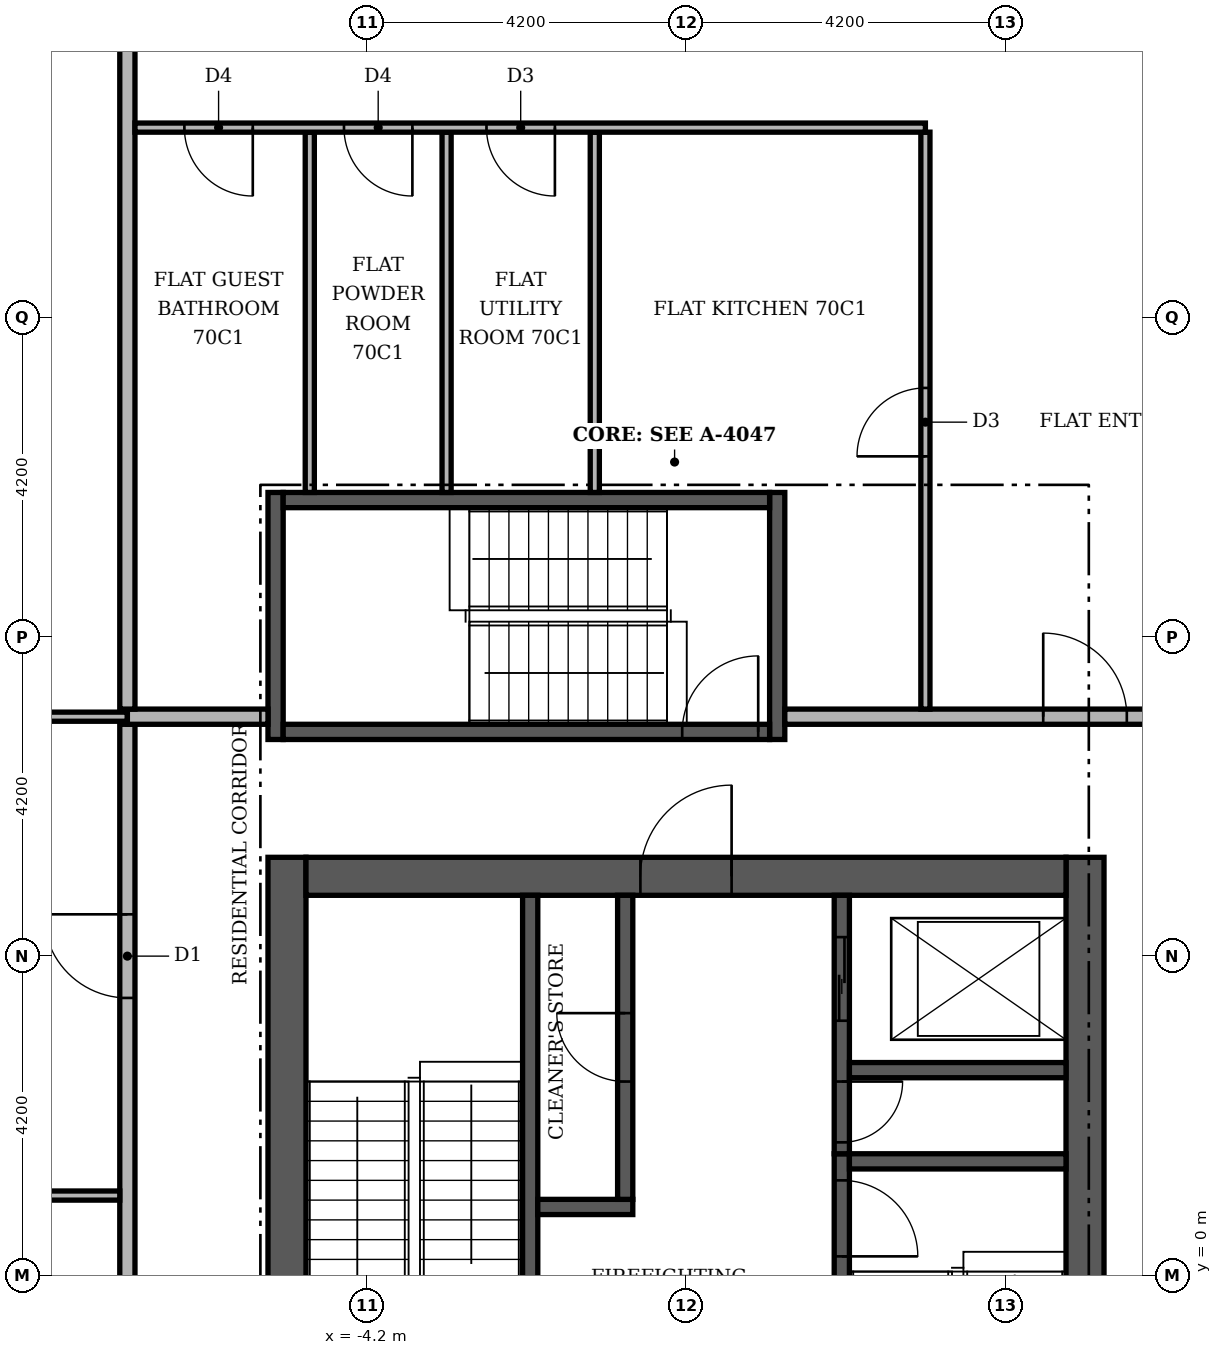
"""IFC4 building model, lengths in metres.
Left out: names, types, materials, properties, quantities, classifications, styles, units other than length and angle.
Written with IfcOpenShell. Run it as: python <this file> out.ifc"""

import sys

from ifc_helpers import new_model, si_unit, direction, frame, frame_2d, origin, place, context, subcontext, project, spatial, rectangle, extrude, element, fill, save


model = new_model("IFC4")
c1 = context("Model", 3, precision=1e-05, world=origin(), true_north=direction((0.0, 1.0)))
c2 = subcontext(c1, "Body", "Model", "MODEL_VIEW")
j1 = project(units=[si_unit("LENGTHUNIT", "METRE"), si_unit("PLANEANGLEUNIT", "RADIAN")], contexts=[c1])
p1 = place(None, origin())
s1 = spatial("IfcSite", under=j1, at=p1, CompositionType="ELEMENT")
p2 = place(p1, origin())
s2 = spatial("IfcBuilding", under=s1, at=p2, CompositionType="ELEMENT")
p3 = place(p2, frame((0.0, 0.0, 292.8)))
s3 = spatial("IfcBuildingStorey", under=s2, at=p3, CompositionType="ELEMENT", Elevation=292.8)
for number, where, z_axis, x_axis in (
    (1, (-5.25, -5.0, 0.0), (0.0, 0.0, 1.0), (0.0, 1.0, 0.0)),
    (2, (5.25, -5.0, 0.0), (0.0, 0.0, 1.0), (0.0, 1.0, 0.0)),
):
    element("IfcWall", number, at=place(p3, frame(where, z_axis=z_axis, x_axis=x_axis)), inside=s3, PredefinedType="SHEAR", context=c2, shape_type="SweptSolid", body=[
        extrude(rectangle(XDim=10.5, YDim=0.5, at=frame_2d((5.25, 0.0))), origin(), (0.0, 0.0, 1.0), 3.55),
    ])
p4 = place(p3, frame((-5.0, 5.25, 0.0), z_axis=(0.0, 0.0, 1.0), x_axis=(1.0, 0.0, 0.0)))
e3 = element("IfcWall", 3, at=p4, inside=s3, PredefinedType="SHEAR", context=c2, shape_type="SweptSolid", body=[
    extrude(rectangle(XDim=10.0, YDim=0.5, at=frame_2d((5.0, 0.0))), origin(), (0.0, 0.0, 1.0), 3.55),
])
p5 = place(p4, frame((4.4, 0.0, 0.0)))
e4 = element("IfcOpeningElement", 4, at=p5, cuts=e3, PredefinedType="OPENING", context=c2, shape_type="SweptSolid", body=[
    extrude(rectangle(XDim=1.2, YDim=2.1, at=frame_2d((0.6, 1.05))), frame((0.0, 0.26, 0.0), z_axis=(0.0, -1.0, 0.0), x_axis=(1.0, 0.0, 0.0)), (0.0, 0.0, 1.0), 0.52),
])
p6 = place(p3, frame((2.05, -5.0, 0.0), z_axis=(0.0, 0.0, 1.0), x_axis=(0.0, 1.0, 0.0)))
e5 = element("IfcWall", 5, at=p6, inside=s3, PredefinedType="SHEAR", context=c2, shape_type="SweptSolid", body=[
    extrude(rectangle(XDim=6.6, YDim=0.2, at=frame_2d((3.3, 0.0))), origin(), (0.0, 0.0, 1.0), 3.55),
])
p7 = place(p6, frame((5.25, 0.0, 0.0)))
e6 = element("IfcOpeningElement", 6, at=p7, cuts=e5, PredefinedType="OPENING", context=c2, shape_type="SweptSolid", body=[
    extrude(rectangle(XDim=1.0, YDim=2.1, at=frame_2d((0.5, 1.05))), frame((0.0, 0.11, 0.0), z_axis=(0.0, -1.0, 0.0), x_axis=(1.0, 0.0, 0.0)), (0.0, 0.0, 1.0), 0.22),
])
p8 = place(p3, frame((-2.05, -1.4, 0.0), z_axis=(0.0, 0.0, 1.0), x_axis=(0.0, 1.0, 0.0)))
e7 = element("IfcWall", 7, at=p8, inside=s3, PredefinedType="SHEAR", context=c2, shape_type="SweptSolid", body=[
    extrude(rectangle(XDim=6.4, YDim=0.2, at=frame_2d((3.2, 0.0))), origin(), (0.0, 0.0, 1.0), 3.55),
])
p9 = place(p8, frame((0.15, 0.0, 0.0)))
e8 = element("IfcOpeningElement", 8, at=p9, cuts=e7, PredefinedType="OPENING", context=c2, shape_type="SweptSolid", body=[
    extrude(rectangle(XDim=1.0, YDim=2.1, at=frame_2d((0.5, 1.05))), frame((0.0, 0.11, 0.0), z_axis=(0.0, -1.0, 0.0), x_axis=(1.0, 0.0, 0.0)), (0.0, 0.0, 1.0), 0.22),
])
p10 = place(p3, frame((2.15, 1.5, 0.0), z_axis=(0.0, 0.0, 1.0), x_axis=(1.0, 0.0, 0.0)))
e9 = element("IfcWall", 9, at=p10, inside=s3, PredefinedType="SHEAR", context=c2, shape_type="SweptSolid", body=[
    extrude(rectangle(XDim=2.85, YDim=0.2, at=frame_2d((1.425, 0.0))), origin(), (0.0, 0.0, 1.0), 3.55),
])
p11 = place(p3, frame((-1.95, 0.9, 0.0), z_axis=(0.0, 0.0, 1.0), x_axis=(1.0, 0.0, 0.0)))
e10 = element("IfcWall", 10, at=p11, inside=s3, PredefinedType="SHEAR", context=c2, shape_type="SweptSolid", body=[
    extrude(rectangle(XDim=1.25, YDim=0.2, at=frame_2d((0.625, 0.0))), origin(), (0.0, 0.0, 1.0), 3.55),
])
p12 = place(p3, frame((-0.8, 1.0, 0.0), z_axis=(0.0, 0.0, 1.0), x_axis=(0.0, 1.0, 0.0)))
e11 = element("IfcWall", 11, at=p12, inside=s3, PredefinedType="SHEAR", context=c2, shape_type="SweptSolid", body=[
    extrude(rectangle(XDim=4.0, YDim=0.2, at=frame_2d((2.0, 0.0))), origin(), (0.0, 0.0, 1.0), 3.55),
])
p13 = place(p12, frame((1.55, 0.0, 0.0)))
e12 = element("IfcOpeningElement", 12, at=p13, cuts=e11, PredefinedType="OPENING", context=c2, shape_type="SweptSolid", body=[
    extrude(rectangle(XDim=0.9, YDim=2.1, at=frame_2d((0.45, 1.05))), frame((0.0, 0.11, 0.0), z_axis=(0.0, -1.0, 0.0), x_axis=(1.0, 0.0, 0.0)), (0.0, 0.0, 1.0), 0.22),
])
p14 = place(p3, frame((2.05, 1.6, 0.0), z_axis=(0.0, 0.0, 1.0), x_axis=(0.0, 1.0, 0.0)))
e13 = element("IfcWall", 13, at=p14, inside=s3, PredefinedType="SHEAR", context=c2, shape_type="SweptSolid", body=[
    extrude(rectangle(XDim=3.4, YDim=0.2, at=frame_2d((1.7, 0.0))), origin(), (0.0, 0.0, 1.0), 3.55),
])
p15 = place(p14, frame((1.75, 0.0, 0.0)))
e14 = element("IfcOpeningElement", 14, at=p15, cuts=e13, PredefinedType="OPENING", context=c2, shape_type="SweptSolid", body=[
    extrude(rectangle(XDim=1.1, YDim=2.1, at=frame_2d((0.55, 1.05))), frame((0.0, 0.11, 0.0), z_axis=(0.0, -1.0, 0.0), x_axis=(1.0, 0.0, 0.0)), (0.0, 0.0, 1.0), 0.22),
])
p16 = place(p14, frame((0.15, 0.0, 0.0)))
e15 = element("IfcOpeningElement", 15, at=p16, cuts=e13, PredefinedType="OPENING", context=c2, shape_type="SweptSolid", body=[
    extrude(rectangle(XDim=0.8, YDim=2.1, at=frame_2d((0.4, 1.05))), frame((0.0, 0.11, 0.0), z_axis=(0.0, -1.0, 0.0), x_axis=(1.0, 0.0, 0.0)), (0.0, 0.0, 1.0), 0.22),
])
p17 = place(p3, frame((2.15, 2.7, 0.0), z_axis=(0.0, 0.0, 1.0), x_axis=(1.0, 0.0, 0.0)))
e16 = element("IfcWall", 16, at=p17, inside=s3, PredefinedType="SHEAR", context=c2, shape_type="SweptSolid", body=[
    extrude(rectangle(XDim=2.85, YDim=0.2, at=frame_2d((1.425, 0.0))), origin(), (0.0, 0.0, 1.0), 3.55),
])
for number, where, z_axis, x_axis in (
    (17, (-5.4, 7.05, 0.0), (0.0, 0.0, 1.0), (0.0, 1.0, 0.0)),
    (18, (1.2, 7.05, 0.0), (0.0, 0.0, 1.0), (0.0, 1.0, 0.0)),
):
    element("IfcWall", number, at=place(p3, frame(where, z_axis=z_axis, x_axis=x_axis)), inside=s3, PredefinedType="SHEAR", context=c2, shape_type="SweptSolid", body=[
        extrude(rectangle(XDim=3.25, YDim=0.2, at=frame_2d((1.625, 0.0))), origin(), (0.0, 0.0, 1.0), 3.55),
    ])
p18 = place(p3, frame((-5.3, 7.15, 0.0), z_axis=(0.0, 0.0, 1.0), x_axis=(1.0, 0.0, 0.0)))
e19 = element("IfcWall", 19, at=p18, inside=s3, PredefinedType="SHEAR", context=c2, shape_type="SweptSolid", body=[
    extrude(rectangle(XDim=6.4, YDim=0.2, at=frame_2d((3.2, 0.0))), origin(), (0.0, 0.0, 1.0), 3.55),
])
p19 = place(p18, frame((5.25, 0.0, 0.0)))
e20 = element("IfcOpeningElement", 20, at=p19, cuts=e19, PredefinedType="OPENING", context=c2, shape_type="SweptSolid", body=[
    extrude(rectangle(XDim=1.0, YDim=2.1, at=frame_2d((0.5, 1.05))), frame((0.0, 0.11, 0.0), z_axis=(0.0, -1.0, 0.0), x_axis=(1.0, 0.0, 0.0)), (0.0, 0.0, 1.0), 0.22),
])
p20 = place(p3, frame((-5.3, 10.2, 0.0), z_axis=(0.0, 0.0, 1.0), x_axis=(1.0, 0.0, 0.0)))
e21 = element("IfcWall", 21, at=p20, inside=s3, PredefinedType="SHEAR", context=c2, shape_type="SweptSolid", body=[
    extrude(rectangle(XDim=6.4, YDim=0.2, at=frame_2d((3.2, 0.0))), origin(), (0.0, 0.0, 1.0), 3.55),
])
p21 = place(p3, frame((-7.35, -7.25, 0.0), z_axis=(0.0, 0.0, 1.0), x_axis=(0.0, 1.0, 0.0)))
e22 = element("IfcWall", 22, at=p21, inside=s3, PredefinedType="PARTITIONING", context=c2, shape_type="SweptSolid", body=[
    extrude(rectangle(XDim=14.5, YDim=0.2, at=frame_2d((7.25, 0.0))), origin(), (0.0, 0.0, 1.0), 3.55),
])
p22 = place(p21, frame((10.9, 0.0, 0.0)))
e23 = element("IfcOpeningElement", 23, at=p22, cuts=e22, PredefinedType="OPENING", context=c2, shape_type="SweptSolid", body=[
    extrude(rectangle(XDim=1.1, YDim=2.4, at=frame_2d((0.55, 1.2))), frame((0.0, 0.11, 0.0), z_axis=(0.0, -1.0, 0.0), x_axis=(1.0, 0.0, 0.0)), (0.0, 0.0, 1.0), 0.22),
])
p23 = place(p3, frame((-14.5, 1.05, 0.0), z_axis=(0.0, 0.0, 1.0), x_axis=(1.0, 0.0, 0.0)))
e24 = element("IfcWall", 24, at=p23, inside=s3, PredefinedType="PARTITIONING", context=c2, shape_type="SweptSolid", body=[
    extrude(rectangle(XDim=7.05, YDim=0.12, at=frame_2d((3.525, 0.0))), origin(), (0.0, 0.0, 1.0), 3.55),
])
p24 = place(p23, frame((3.125, 0.0, 0.0)))
e25 = element("IfcOpeningElement", 25, at=p24, cuts=e24, PredefinedType="OPENING", context=c2, shape_type="SweptSolid", body=[
    extrude(rectangle(XDim=0.9, YDim=2.1, at=frame_2d((0.45, 1.05))), frame((0.0, 0.07, 0.0), z_axis=(0.0, -1.0, 0.0), x_axis=(1.0, 0.0, 0.0)), (0.0, 0.0, 1.0), 0.14),
])
p25 = place(p3, frame((-16.0, 7.35, 0.0), z_axis=(0.0, 0.0, 1.0), x_axis=(1.0, 0.0, 0.0)))
e26 = element("IfcWall", 26, at=p25, inside=s3, PredefinedType="PARTITIONING", context=c2, shape_type="SweptSolid", body=[
    extrude(rectangle(XDim=8.65, YDim=0.12, at=frame_2d((4.325, 0.0))), origin(), (0.0, 0.0, 1.0), 3.55),
])
p26 = place(p25, frame((3.875, 0.0, 0.0)))
e27 = element("IfcOpeningElement", 27, at=p26, cuts=e26, PredefinedType="OPENING", context=c2, shape_type="SweptSolid", body=[
    extrude(rectangle(XDim=0.9, YDim=2.1, at=frame_2d((0.45, 1.05))), frame((0.0, 0.07, 0.0), z_axis=(0.0, -1.0, 0.0), x_axis=(1.0, 0.0, 0.0)), (0.0, 0.0, 1.0), 0.14),
])
p27 = place(p3, frame((-7.35, 7.35, 0.0), z_axis=(0.0, 0.0, 1.0), x_axis=(1.0, 0.0, 0.0)))
e28 = element("IfcWall", 28, at=p27, inside=s3, PredefinedType="PARTITIONING", context=c2, shape_type="SweptSolid", body=[
    extrude(rectangle(XDim=1.85, YDim=0.2, at=frame_2d((0.925, 0.0))), origin(), (0.0, 0.0, 1.0), 3.55),
])
p28 = place(p3, frame((1.3, 7.35, 0.0), z_axis=(0.0, 0.0, 1.0), x_axis=(1.0, 0.0, 0.0)))
e29 = element("IfcWall", 29, at=p28, inside=s3, PredefinedType="PARTITIONING", context=c2, shape_type="SweptSolid", body=[
    extrude(rectangle(XDim=20.0, YDim=0.2, at=frame_2d((10.0, 0.0))), origin(), (0.0, 0.0, 1.0), 3.55),
])
p29 = place(p28, frame((3.4, 0.0, 0.0)))
e30 = element("IfcOpeningElement", 30, at=p29, cuts=e29, PredefinedType="OPENING", context=c2, shape_type="SweptSolid", body=[
    extrude(rectangle(XDim=1.1, YDim=2.4, at=frame_2d((0.55, 1.2))), frame((0.0, 0.11, 0.0), z_axis=(0.0, -1.0, 0.0), x_axis=(1.0, 0.0, 0.0)), (0.0, 0.0, 1.0), 0.22),
])
p30 = place(p3, frame((-7.35, 7.45, 0.0), z_axis=(0.0, 0.0, 1.0), x_axis=(0.0, 1.0, 0.0)))
e31 = element("IfcWall", 31, at=p30, inside=s3, PredefinedType="PARTITIONING", context=c2, shape_type="SweptSolid", body=[
    extrude(rectangle(XDim=13.85, YDim=0.2, at=frame_2d((6.925, 0.0))), origin(), (0.0, 0.0, 1.0), 3.55),
])
p31 = place(p3, frame((3.15, 7.45, 0.0), z_axis=(0.0, 0.0, 1.0), x_axis=(0.0, 1.0, 0.0)))
e32 = element("IfcWall", 32, at=p31, inside=s3, PredefinedType="PARTITIONING", context=c2, shape_type="SweptSolid", body=[
    extrude(rectangle(XDim=7.59, YDim=0.12, at=frame_2d((3.795, 0.0))), origin(), (0.0, 0.0, 1.0), 3.55),
])
p32 = place(p31, frame((3.325, 0.0, 0.0)))
e33 = element("IfcOpeningElement", 33, at=p32, cuts=e32, PredefinedType="OPENING", context=c2, shape_type="SweptSolid", body=[
    extrude(rectangle(XDim=0.9, YDim=2.1, at=frame_2d((0.45, 1.05))), frame((0.0, 0.07, 0.0), z_axis=(0.0, -1.0, 0.0), x_axis=(1.0, 0.0, 0.0)), (0.0, 0.0, 1.0), 0.14),
])
for number, where, z_axis, x_axis in (
    (34, (-4.95, 10.3, 0.0), (0.0, 0.0, 1.0), (0.0, 1.0, 0.0)),
    (35, (-3.15, 10.3, 0.0), (0.0, 0.0, 1.0), (0.0, 1.0, 0.0)),
    (36, (-1.2, 10.3, 0.0), (0.0, 0.0, 1.0), (0.0, 1.0, 0.0)),
):
    element("IfcWall", number, at=place(p3, frame(where, z_axis=z_axis, x_axis=x_axis)), inside=s3, PredefinedType="PARTITIONING", context=c2, shape_type="SweptSolid", body=[
        extrude(rectangle(XDim=4.74, YDim=0.12, at=frame_2d((2.37, 0.0))), origin(), (0.0, 0.0, 1.0), 3.55),
    ])
p33 = place(p3, frame((-7.25, 15.1, 0.0), z_axis=(0.0, 0.0, 1.0), x_axis=(1.0, 0.0, 0.0)))
e37 = element("IfcWall", 37, at=p33, inside=s3, PredefinedType="PARTITIONING", context=c2, shape_type="SweptSolid", body=[
    extrude(rectangle(XDim=10.4, YDim=0.12, at=frame_2d((5.2, 0.0))), origin(), (0.0, 0.0, 1.0), 3.55),
])
p34 = place(p33, frame((4.625, 0.0, 0.0)))
e38 = element("IfcOpeningElement", 38, at=p34, cuts=e37, PredefinedType="OPENING", context=c2, shape_type="SweptSolid", body=[
    extrude(rectangle(XDim=0.9, YDim=2.1, at=frame_2d((0.45, 1.05))), frame((0.0, 0.07, 0.0), z_axis=(0.0, -1.0, 0.0), x_axis=(1.0, 0.0, 0.0)), (0.0, 0.0, 1.0), 0.14),
])
p35 = place(p33, frame((2.75, 0.0, 0.0)))
e39 = element("IfcOpeningElement", 39, at=p35, cuts=e37, PredefinedType="OPENING", context=c2, shape_type="SweptSolid", body=[
    extrude(rectangle(XDim=0.9, YDim=2.1, at=frame_2d((0.45, 1.05))), frame((0.0, 0.07, 0.0), z_axis=(0.0, -1.0, 0.0), x_axis=(1.0, 0.0, 0.0)), (0.0, 0.0, 1.0), 0.14),
])
p36 = place(p33, frame((0.65, 0.0, 0.0)))
e40 = element("IfcOpeningElement", 40, at=p36, cuts=e37, PredefinedType="OPENING", context=c2, shape_type="SweptSolid", body=[
    extrude(rectangle(XDim=0.9, YDim=2.1, at=frame_2d((0.45, 1.05))), frame((0.0, 0.07, 0.0), z_axis=(0.0, -1.0, 0.0), x_axis=(1.0, 0.0, 0.0)), (0.0, 0.0, 1.0), 0.14),
])
p37 = place(p15, origin())
e41 = element("IfcDoor", 41, at=p37, inside=s3, OperationType="SLIDING_TO_LEFT", PredefinedType="DOOR", context=c2, shape_type="SweptSolid", body=[
    extrude(rectangle(XDim=1.1, YDim=2.1, at=frame_2d((0.55, 1.05))), frame((0.0, 0.025, 0.0), z_axis=(0.0, -1.0, 0.0), x_axis=(1.0, 0.0, 0.0)), (0.0, 0.0, 1.0), 0.05),
])
fill(e14, e41)
p38 = place(p7, frame((1.0, 0.0, 0.0), z_axis=(0.0, 0.0, 1.0), x_axis=(-1.0, 0.0, 0.0)))
e42 = element("IfcDoor", 42, at=p38, inside=s3, OperationType="SINGLE_SWING_LEFT", PredefinedType="DOOR", context=c2, shape_type="SweptSolid", body=[
    extrude(rectangle(XDim=1.0, YDim=2.1, at=frame_2d((0.5, 1.05))), frame((0.0, 0.025, 0.0), z_axis=(0.0, -1.0, 0.0), x_axis=(1.0, 0.0, 0.0)), (0.0, 0.0, 1.0), 0.05),
])
fill(e6, e42)
p39 = place(p16, frame((0.8, 0.0, 0.0), z_axis=(0.0, 0.0, 1.0), x_axis=(-1.0, 0.0, 0.0)))
e43 = element("IfcDoor", 43, at=p39, inside=s3, OperationType="SINGLE_SWING_RIGHT", PredefinedType="DOOR", context=c2, shape_type="SweptSolid", body=[
    extrude(rectangle(XDim=0.8, YDim=2.1, at=frame_2d((0.4, 1.05))), frame((0.0, 0.025, 0.0), z_axis=(0.0, -1.0, 0.0), x_axis=(1.0, 0.0, 0.0)), (0.0, 0.0, 1.0), 0.05),
])
fill(e15, e43)
p40 = place(p19, origin())
e44 = element("IfcDoor", 44, at=p40, inside=s3, OperationType="SINGLE_SWING_RIGHT", PredefinedType="DOOR", context=c2, shape_type="SweptSolid", body=[
    extrude(rectangle(XDim=1.0, YDim=2.1, at=frame_2d((0.5, 1.05))), frame((0.0, 0.025, 0.0), z_axis=(0.0, -1.0, 0.0), x_axis=(1.0, 0.0, 0.0)), (0.0, 0.0, 1.0), 0.05),
])
fill(e20, e44)
p41 = place(p13, origin())
e45 = element("IfcDoor", 45, at=p41, inside=s3, OperationType="SINGLE_SWING_RIGHT", PredefinedType="DOOR", context=c2, shape_type="SweptSolid", body=[
    extrude(rectangle(XDim=0.9, YDim=2.1, at=frame_2d((0.45, 1.05))), frame((0.0, 0.025, 0.0), z_axis=(0.0, -1.0, 0.0), x_axis=(1.0, 0.0, 0.0)), (0.0, 0.0, 1.0), 0.05),
])
fill(e12, e45)
p42 = place(p5, origin())
e46 = element("IfcDoor", 46, at=p42, inside=s3, OperationType="SINGLE_SWING_RIGHT", PredefinedType="DOOR", context=c2, shape_type="SweptSolid", body=[
    extrude(rectangle(XDim=1.2, YDim=2.1, at=frame_2d((0.6, 1.05))), frame((0.0, 0.025, 0.0), z_axis=(0.0, -1.0, 0.0), x_axis=(1.0, 0.0, 0.0)), (0.0, 0.0, 1.0), 0.05),
])
fill(e4, e46)
p43 = place(p29, origin())
e47 = element("IfcDoor", 47, at=p43, inside=s3, OperationType="SINGLE_SWING_LEFT", PredefinedType="DOOR", context=c2, shape_type="SweptSolid", body=[
    extrude(rectangle(XDim=1.1, YDim=2.4, at=frame_2d((0.55, 1.2))), frame((0.0, 0.025, 0.0), z_axis=(0.0, -1.0, 0.0), x_axis=(1.0, 0.0, 0.0)), (0.0, 0.0, 1.0), 0.05),
])
fill(e30, e47)
p44 = place(p32, origin())
e48 = element("IfcDoor", 48, at=p44, inside=s3, OperationType="SINGLE_SWING_LEFT", PredefinedType="DOOR", context=c2, shape_type="SweptSolid", body=[
    extrude(rectangle(XDim=0.9, YDim=2.1, at=frame_2d((0.45, 1.05))), frame((0.0, 0.025, 0.0), z_axis=(0.0, -1.0, 0.0), x_axis=(1.0, 0.0, 0.0)), (0.0, 0.0, 1.0), 0.05),
])
fill(e33, e48)
p45 = place(p34, frame((0.9, 0.0, 0.0), z_axis=(0.0, 0.0, 1.0), x_axis=(-1.0, 0.0, 0.0)))
e49 = element("IfcDoor", 49, at=p45, inside=s3, OperationType="SINGLE_SWING_RIGHT", PredefinedType="DOOR", context=c2, shape_type="SweptSolid", body=[
    extrude(rectangle(XDim=0.9, YDim=2.1, at=frame_2d((0.45, 1.05))), frame((0.0, 0.025, 0.0), z_axis=(0.0, -1.0, 0.0), x_axis=(1.0, 0.0, 0.0)), (0.0, 0.0, 1.0), 0.05),
])
fill(e38, e49)
p46 = place(p35, frame((0.9, 0.0, 0.0), z_axis=(0.0, 0.0, 1.0), x_axis=(-1.0, 0.0, 0.0)))
e50 = element("IfcDoor", 50, at=p46, inside=s3, OperationType="SINGLE_SWING_RIGHT", PredefinedType="DOOR", context=c2, shape_type="SweptSolid", body=[
    extrude(rectangle(XDim=0.9, YDim=2.1, at=frame_2d((0.45, 1.05))), frame((0.0, 0.025, 0.0), z_axis=(0.0, -1.0, 0.0), x_axis=(1.0, 0.0, 0.0)), (0.0, 0.0, 1.0), 0.05),
])
fill(e39, e50)
p47 = place(p36, frame((0.9, 0.0, 0.0), z_axis=(0.0, 0.0, 1.0), x_axis=(-1.0, 0.0, 0.0)))
e51 = element("IfcDoor", 51, at=p47, inside=s3, OperationType="SINGLE_SWING_RIGHT", PredefinedType="DOOR", context=c2, shape_type="SweptSolid", body=[
    extrude(rectangle(XDim=0.9, YDim=2.1, at=frame_2d((0.45, 1.05))), frame((0.0, 0.025, 0.0), z_axis=(0.0, -1.0, 0.0), x_axis=(1.0, 0.0, 0.0)), (0.0, 0.0, 1.0), 0.05),
])
fill(e40, e51)
p48 = place(p22, origin())
e52 = element("IfcDoor", 52, at=p48, inside=s3, OperationType="SINGLE_SWING_RIGHT", PredefinedType="DOOR", context=c2, shape_type="SweptSolid", body=[
    extrude(rectangle(XDim=1.1, YDim=2.4, at=frame_2d((0.55, 1.2))), frame((0.0, 0.025, 0.0), z_axis=(0.0, -1.0, 0.0), x_axis=(1.0, 0.0, 0.0)), (0.0, 0.0, 1.0), 0.05),
])
fill(e23, e52)
save(model, sys.argv[1])
